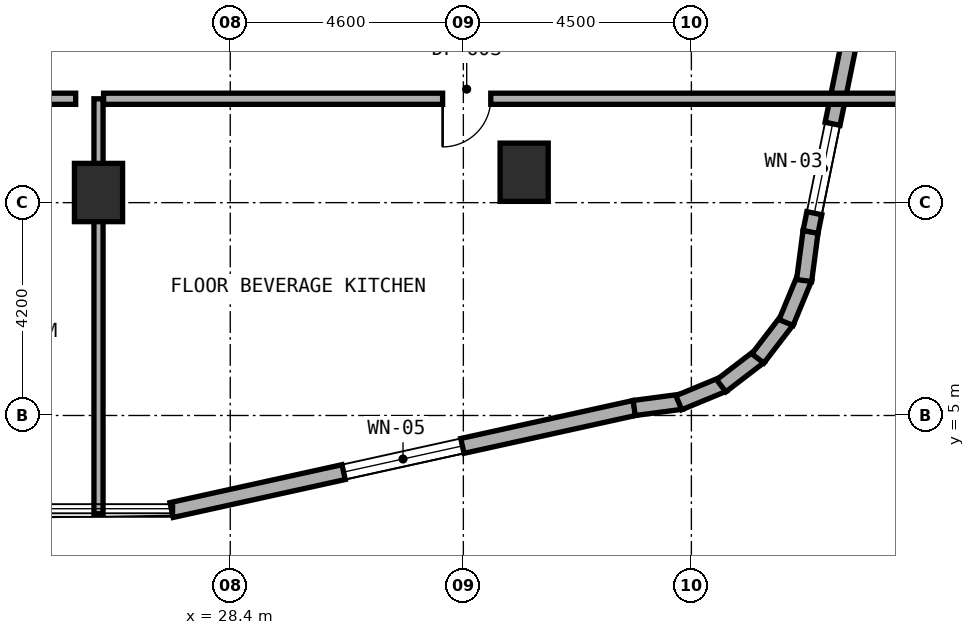
"""IFC4 building model, lengths in metres.
Left out: names, types, materials, properties, quantities, classifications, styles, units other than length and angle.
Written with IfcOpenShell. Run it as: python <this file> out.ifc"""

import sys

from ifc_helpers import new_model, si_unit, direction, frame, frame_2d, origin, origin_2d, place, context, subcontext, project, spatial, rectangle, extrude, element, fill, save


model = new_model("IFC4")
c1 = context("Model", 3, precision=1e-05, world=origin(), true_north=direction((0.0, 1.0)))
c2 = subcontext(c1, "Body", "Model", "MODEL_VIEW")
j1 = project(units=[si_unit("LENGTHUNIT", "METRE"), si_unit("PLANEANGLEUNIT", "RADIAN")], contexts=[c1])
p1 = place(None, origin())
s1 = spatial("IfcSite", under=j1, at=p1, CompositionType="ELEMENT")
p2 = place(p1, origin())
s2 = spatial("IfcBuilding", under=s1, at=p2, CompositionType="ELEMENT")
p3 = place(p2, frame((0.0, 0.0, 62.5)))
s3 = spatial("IfcBuildingStorey", under=s2, at=p3, CompositionType="ELEMENT", Elevation=62.5)
for number, where, z_axis, x_axis in (
    (1, (25.8, 9.4, 0.0), (0.0, 0.0, 1.0), (1.0, 0.0, 0.0)),
    (2, (34.2, 9.8, 0.0), (0.0, 0.0, 1.0), (1.0, 0.0, 0.0)),
):
    element("IfcColumn", number, at=place(p3, frame(where, z_axis=z_axis, x_axis=x_axis)), inside=s3, PredefinedType="COLUMN", context=c2, shape_type="SweptSolid", body=[
        extrude(rectangle(XDim=0.95, YDim=1.15, at=origin_2d()), origin(), (0.0, 0.0, 1.0), 3.5),
    ])
p4 = place(p3, frame((27.242, 3.134, 0.0), z_axis=(0.0, 0.0, 1.0), x_axis=(0.97654500432, 0.215313386808, 0.0)))
e3 = element("IfcWall", 3, at=p4, inside=s3, PredefinedType="STANDARD", context=c2, shape_type="SweptSolid", body=[
    extrude(rectangle(XDim=9.354, YDim=0.3, at=frame_2d((4.677, 0.0))), origin(), (0.0, 0.0, 1.0), 3.22),
])
p5 = place(p4, frame((3.477, 0.0, 0.8)))
e4 = element("IfcOpeningElement", 4, at=p5, cuts=e3, PredefinedType="OPENING", context=c2, shape_type="SweptSolid", body=[
    extrude(rectangle(XDim=2.4, YDim=1.6, at=frame_2d((1.2, 0.8))), frame((0.0, 0.16, 0.0), z_axis=(0.0, -1.0, 0.0), x_axis=(1.0, 0.0, 0.0)), (0.0, 0.0, 1.0), 0.32),
])
p6 = place(p3, frame((36.372, 5.148, 0.0), z_axis=(0.0, 0.0, 1.0), x_axis=(0.991359246108, 0.131174864804, 0.0)))
e5 = element("IfcWall", 5, at=p6, inside=s3, PredefinedType="STANDARD", context=c2, shape_type="SweptSolid", body=[
    extrude(rectangle(XDim=0.938, YDim=0.3, at=frame_2d((0.469, 0.0))), origin(), (0.0, 0.0, 1.0), 3.22),
])
p7 = place(p3, frame((37.252, 5.252, 0.0), z_axis=(0.0, 0.0, 1.0), x_axis=(0.924019948111, 0.382344263057, 0.0)))
e6 = element("IfcWall", 6, at=p7, inside=s3, PredefinedType="STANDARD", context=c2, shape_type="SweptSolid", body=[
    extrude(rectangle(XDim=0.955, YDim=0.3, at=frame_2d((0.477, 0.0))), origin(), (0.0, 0.0, 1.0), 3.22),
])
p8 = place(p3, frame((38.089, 5.586, 0.0), z_axis=(0.0, 0.0, 1.0), x_axis=(0.793573440799, 0.608474481025, 0.0)))
e7 = element("IfcWall", 7, at=p8, inside=s3, PredefinedType="STANDARD", context=c2, shape_type="SweptSolid", body=[
    extrude(rectangle(XDim=0.955, YDim=0.3, at=frame_2d((0.478, 0.0))), origin(), (0.0, 0.0, 1.0), 3.22),
])
p9 = place(p3, frame((38.812, 6.125, 0.0), z_axis=(0.0, 0.0, 1.0), x_axis=(0.608351047625, 0.793668068435, 0.0)))
e8 = element("IfcWall", 8, at=p9, inside=s3, PredefinedType="STANDARD", context=c2, shape_type="SweptSolid", body=[
    extrude(rectangle(XDim=0.955, YDim=0.3, at=frame_2d((0.478, 0.0))), origin(), (0.0, 0.0, 1.0), 3.22),
])
p10 = place(p3, frame((39.369, 6.834, 0.0), z_axis=(0.0, 0.0, 1.0), x_axis=(0.382344263057, 0.924019948111, 0.0)))
e9 = element("IfcWall", 9, at=p10, inside=s3, PredefinedType="STANDARD", context=c2, shape_type="SweptSolid", body=[
    extrude(rectangle(XDim=0.955, YDim=0.3, at=frame_2d((0.477, 0.0))), origin(), (0.0, 0.0, 1.0), 3.22),
])
p11 = place(p3, frame((39.725, 7.663, 0.0), z_axis=(0.0, 0.0, 1.0), x_axis=(0.130454512571, 0.991454295543, 0.0)))
e10 = element("IfcWall", 10, at=p11, inside=s3, PredefinedType="STANDARD", context=c2, shape_type="SweptSolid", body=[
    extrude(rectangle(XDim=0.973, YDim=0.3, at=frame_2d((0.487, 0.0))), origin(), (0.0, 0.0, 1.0), 3.22),
])
p12 = place(p3, frame((39.851, 8.622, 0.0), z_axis=(0.0, 0.0, 1.0), x_axis=(0.199990901713, 0.979797754249, 0.0)))
e11 = element("IfcWall", 11, at=p12, inside=s3, PredefinedType="STANDARD", context=c2, shape_type="SweptSolid", body=[
    extrude(rectangle(XDim=10.065, YDim=0.3, at=frame_2d((5.033, 0.0))), origin(), (0.0, 0.0, 1.0), 3.22),
])
p13 = place(p12, frame((0.378, 0.0, 0.85)))
e12 = element("IfcOpeningElement", 12, at=p13, cuts=e11, PredefinedType="OPENING", context=c2, shape_type="SweptSolid", body=[
    extrude(rectangle(XDim=1.8, YDim=1.5, at=frame_2d((0.9, 0.75))), frame((0.0, 0.16, 0.0), z_axis=(0.0, -1.0, 0.0), x_axis=(1.0, 0.0, 0.0)), (0.0, 0.0, 1.0), 0.32),
])
p14 = place(p12, frame((5.236, 0.0, 0.8)))
e13 = element("IfcOpeningElement", 13, at=p14, cuts=e11, PredefinedType="OPENING", context=c2, shape_type="SweptSolid", body=[
    extrude(rectangle(XDim=2.4, YDim=1.6, at=frame_2d((1.2, 0.8))), frame((0.0, 0.16, 0.0), z_axis=(0.0, -1.0, 0.0), x_axis=(1.0, 0.0, 0.0)), (0.0, 0.0, 1.0), 0.32),
])
p15 = place(p3, frame((17.15, 11.25, 0.0), z_axis=(0.0, 0.0, 1.0), x_axis=(1.0, 0.0, 0.0)))
e14 = element("IfcWall", 14, at=p15, inside=s3, PredefinedType="SOLIDWALL", context=c2, shape_type="SweptSolid", body=[
    extrude(rectangle(XDim=8.2, YDim=0.22, at=frame_2d((4.1, 0.0))), origin(), (0.0, 0.0, 1.0), 2.865),
])
p16 = place(p15, frame((3.185, 0.0, 0.0)))
e15 = element("IfcOpeningElement", 15, at=p16, cuts=e14, PredefinedType="OPENING", context=c2, shape_type="SweptSolid", body=[
    extrude(rectangle(XDim=1.1, YDim=2.1, at=frame_2d((0.55, 1.05))), frame((0.0, 0.12, 0.0), z_axis=(0.0, -1.0, 0.0), x_axis=(1.0, 0.0, 0.0)), (0.0, 0.0, 1.0), 0.24),
])
p17 = place(p3, frame((25.8, 3.06, 0.0), z_axis=(0.0, 0.0, 1.0), x_axis=(0.0, 1.0, 0.0)))
e16 = element("IfcWall", 16, at=p17, inside=s3, PredefinedType="SOLIDWALL", context=c2, shape_type="SweptSolid", body=[
    extrude(rectangle(XDim=8.19, YDim=0.18, at=frame_2d((4.095, 0.0))), origin(), (0.0, 0.0, 1.0), 2.495),
])
p18 = place(p3, frame((25.9, 11.25, 0.0), z_axis=(0.0, 0.0, 1.0), x_axis=(1.0, 0.0, 0.0)))
e17 = element("IfcWall", 17, at=p18, inside=s3, PredefinedType="SOLIDWALL", context=c2, shape_type="SweptSolid", body=[
    extrude(rectangle(XDim=15.84, YDim=0.22, at=frame_2d((7.92, 0.0))), origin(), (0.0, 0.0, 1.0), 2.495),
])
p19 = place(p18, frame((6.691, 0.0, 0.0)))
e18 = element("IfcOpeningElement", 18, at=p19, cuts=e17, PredefinedType="OPENING", context=c2, shape_type="SweptSolid", body=[
    extrude(rectangle(XDim=0.95, YDim=2.1, at=frame_2d((0.475, 1.05))), frame((0.0, 0.12, 0.0), z_axis=(0.0, -1.0, 0.0), x_axis=(1.0, 0.0, 0.0)), (0.0, 0.0, 1.0), 0.24),
])
p20 = place(p5, origin())
e19 = element("IfcWindow", 19, at=p20, inside=s3, PartitioningType="SINGLE_PANEL", PredefinedType="WINDOW", context=c2, shape_type="SweptSolid", body=[
    extrude(rectangle(XDim=2.4, YDim=1.6, at=frame_2d((1.2, 0.8))), frame((0.0, 0.03, 0.0), z_axis=(0.0, -1.0, 0.0), x_axis=(1.0, 0.0, 0.0)), (0.0, 0.0, 1.0), 0.06),
])
fill(e4, e19)
p21 = place(p13, origin())
e20 = element("IfcWindow", 20, at=p21, inside=s3, PartitioningType="SINGLE_PANEL", PredefinedType="WINDOW", context=c2, shape_type="SweptSolid", body=[
    extrude(rectangle(XDim=1.8, YDim=1.5, at=frame_2d((0.9, 0.75))), frame((0.0, 0.03, 0.0), z_axis=(0.0, -1.0, 0.0), x_axis=(1.0, 0.0, 0.0)), (0.0, 0.0, 1.0), 0.06),
])
fill(e12, e20)
p22 = place(p19, frame((0.95, 0.0, 0.0), z_axis=(0.0, 0.0, 1.0), x_axis=(-1.0, 0.0, 0.0)))
e21 = element("IfcDoor", 21, at=p22, inside=s3, OperationType="SINGLE_SWING_RIGHT", PredefinedType="DOOR", context=c2, shape_type="SweptSolid", body=[
    extrude(rectangle(XDim=0.95, YDim=2.1, at=frame_2d((0.475, 1.05))), frame((0.0, 0.025, 0.0), z_axis=(0.0, -1.0, 0.0), x_axis=(1.0, 0.0, 0.0)), (0.0, 0.0, 1.0), 0.05),
])
fill(e18, e21)
save(model, sys.argv[1])
